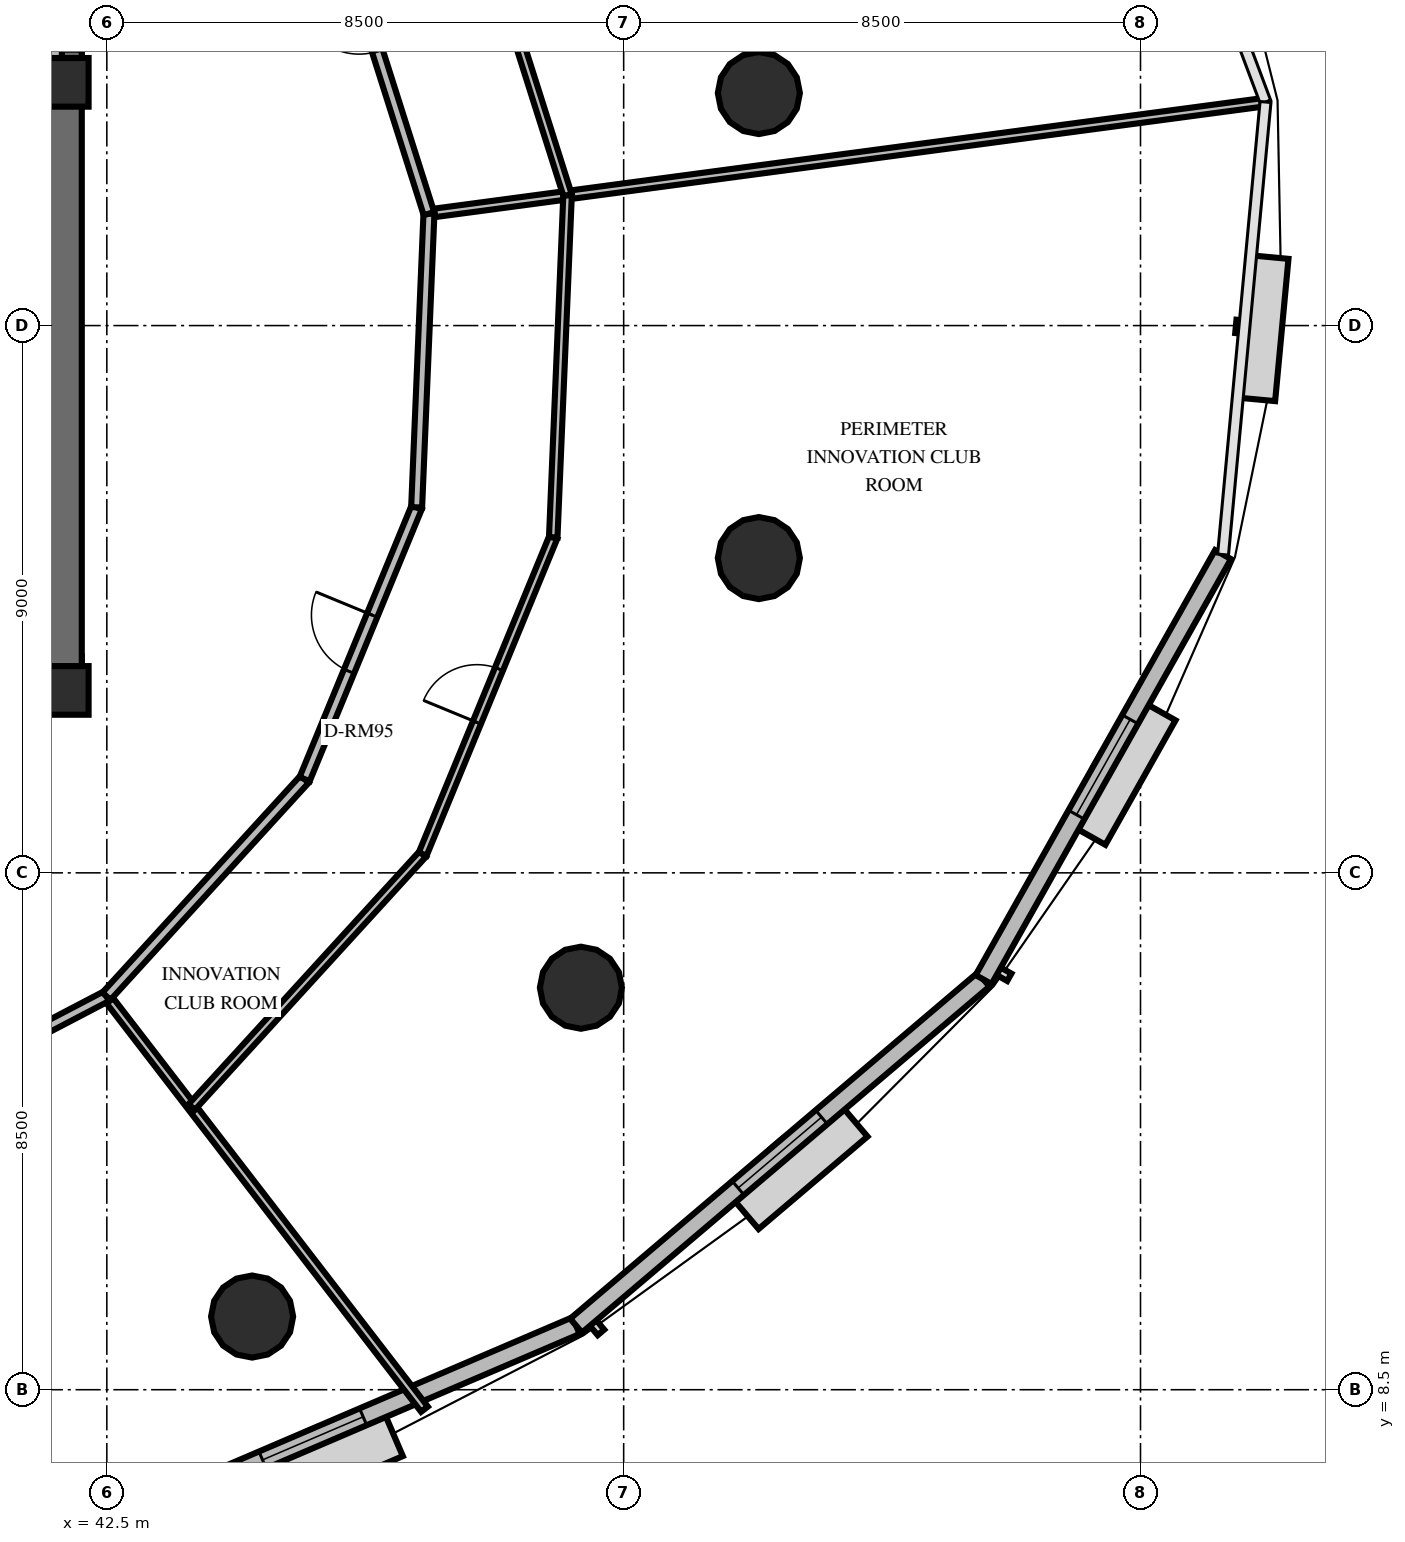
"""IFC4 building model, lengths in metres.
Left out: names, types, materials, properties, quantities, classifications, styles, units other than length and angle.
Written with IfcOpenShell. Run it as: python <this file> out.ifc"""

import sys

from ifc_helpers import new_model, si_unit, direction, frame, frame_2d, origin, origin_2d, place, context, subcontext, project, spatial, rectangle, circle, extrude, element, fill, save


model = new_model("IFC4")
c1 = context("Model", 3, precision=1e-05, world=origin(), true_north=direction((0.0, 1.0)))
c2 = subcontext(c1, "Body", "Model", "MODEL_VIEW")
j1 = project(units=[si_unit("LENGTHUNIT", "METRE"), si_unit("PLANEANGLEUNIT", "RADIAN")], contexts=[c1])
p1 = place(None, origin())
s1 = spatial("IfcSite", under=j1, at=p1, CompositionType="ELEMENT")
p2 = place(p1, origin())
s2 = spatial("IfcBuilding", under=s1, at=p2, CompositionType="ELEMENT")
p3 = place(p2, frame((0.0, 0.0, 63.6)))
s3 = spatial("IfcBuildingStorey", under=s2, at=p3, CompositionType="ELEMENT", Elevation=63.6)
p4 = place(p3, frame((25.922, 20.112, 0.0), z_axis=(0.0, 0.0, 1.0), x_axis=(1.0, 0.0, 0.0)))
e1 = element("IfcWall", 1, at=p4, inside=s3, PredefinedType="SHEAR", context=c2, shape_type="SweptSolid", body=[
    extrude(rectangle(XDim=16.166, YDim=0.9, at=frame_2d((8.083, 0.0))), origin(), (0.0, 0.0, 1.0), 4.2),
])
p5 = place(p3, frame((25.922, 30.088, 0.0), z_axis=(0.0, 0.0, 1.0), x_axis=(1.0, 0.0, 0.0)))
e2 = element("IfcWall", 2, at=p5, inside=s3, PredefinedType="SHEAR", context=c2, shape_type="SweptSolid", body=[
    extrude(rectangle(XDim=16.166, YDim=0.9, at=frame_2d((8.083, 0.0))), origin(), (0.0, 0.0, 1.0), 4.2),
])
p6 = place(p5, frame((1.028, 0.0, 0.0)))
e3 = element("IfcOpeningElement", 3, at=p6, cuts=e2, PredefinedType="OPENING", context=c2, shape_type="SweptSolid", body=[
    extrude(rectangle(XDim=1.05, YDim=2.15, at=frame_2d((0.525, 1.075))), frame((0.0, 0.46, 0.0), z_axis=(0.0, -1.0, 0.0), x_axis=(1.0, 0.0, 0.0)), (0.0, 0.0, 1.0), 0.92),
])
p7 = place(p5, frame((14.078, 0.0, 0.0)))
e4 = element("IfcOpeningElement", 4, at=p7, cuts=e2, PredefinedType="OPENING", context=c2, shape_type="SweptSolid", body=[
    extrude(rectangle(XDim=1.05, YDim=2.15, at=frame_2d((0.525, 1.075))), frame((0.0, 0.46, 0.0), z_axis=(0.0, -1.0, 0.0), x_axis=(1.0, 0.0, 0.0)), (0.0, 0.0, 1.0), 0.92),
])
p8 = place(p5, frame((7.528, 0.0, 0.0)))
e5 = element("IfcOpeningElement", 5, at=p8, cuts=e2, PredefinedType="OPENING", context=c2, shape_type="SweptSolid", body=[
    extrude(rectangle(XDim=1.1, YDim=2.15, at=frame_2d((0.55, 1.075))), frame((0.0, 0.46, 0.0), z_axis=(0.0, -1.0, 0.0), x_axis=(1.0, 0.0, 0.0)), (0.0, 0.0, 1.0), 0.92),
])
p9 = place(p3, frame((41.638, 19.662, 0.0), z_axis=(0.0, 0.0, 1.0), x_axis=(0.0, 1.0, 0.0)))
e6 = element("IfcWall", 6, at=p9, inside=s3, PredefinedType="SHEAR", context=c2, shape_type="SweptSolid", body=[
    extrude(rectangle(XDim=10.876, YDim=0.9, at=frame_2d((5.438, 0.0))), origin(), (0.0, 0.0, 1.0), 4.2),
])
for number, where, z_axis, x_axis in (
    (7, (41.8, 20.0, 0.0), (0.0, 0.0, 1.0), (1.0, 0.0, 0.0)),
    (8, (41.8, 30.0, 0.0), (0.0, 0.0, 1.0), (1.0, 0.0, 0.0)),
):
    element("IfcColumn", number, at=place(p3, frame(where, z_axis=z_axis, x_axis=x_axis)), inside=s3, PredefinedType="PILASTER", context=c2, shape_type="SweptSolid", body=[
        extrude(rectangle(XDim=0.8, YDim=0.8, at=origin_2d()), origin(), (0.0, 0.0, 1.0), 4.2),
    ])
for number, where, z_axis, x_axis in (
    (9, (53.223, 29.824, 0.0), (0.0, 0.0, 1.0), (1.0, 0.0, 0.0)),
    (10, (44.889, 9.703, 0.0), (0.0, 0.0, 1.0), (1.0, 0.0, 0.0)),
    (11, (50.297, 15.111, 0.0), (0.0, 0.0, 1.0), (1.0, 0.0, 0.0)),
    (12, (53.223, 22.176, 0.0), (0.0, 0.0, 1.0), (1.0, 0.0, 0.0)),
):
    element("IfcColumn", number, at=place(p3, frame(where, z_axis=z_axis, x_axis=x_axis)), inside=s3, PredefinedType="COLUMN", context=c2, shape_type="SweptSolid", body=[
        extrude(circle(Radius=0.675, at=origin_2d()), origin(), (0.0, 0.0, 1.0), 4.2),
    ])
p10 = place(p3, frame((41.559, 5.846, 0.0), z_axis=(0.0, 0.0, 1.0), x_axis=(0.919246893901, 0.393681531259, 0.0)))
e13 = element("IfcWall", 13, at=p10, inside=s3, PredefinedType="SOLIDWALL", context=c2, shape_type="SweptSolid", body=[
    extrude(rectangle(XDim=9.419, YDim=0.3, at=frame_2d((4.709, 0.0))), origin(), (0.0, 0.0, 1.0), 3.0),
])
p11 = place(p10, frame((3.809, 0.0, 0.8)))
e14 = element("IfcOpeningElement", 14, at=p11, cuts=e13, PredefinedType="OPENING", context=c2, shape_type="SweptSolid", body=[
    extrude(rectangle(XDim=1.8, YDim=1.95, at=frame_2d((0.9, 0.975))), frame((0.0, 0.16, 0.0), z_axis=(0.0, -1.0, 0.0), x_axis=(1.0, 0.0, 0.0)), (0.0, 0.0, 1.0), 0.32),
])
p12 = place(p3, frame((50.218, 9.554, 0.0), z_axis=(0.0, 0.0, 1.0), x_axis=(0.76225711474, 0.6472743553, 0.0)))
e15 = element("IfcWall", 15, at=p12, inside=s3, PredefinedType="SOLIDWALL", context=c2, shape_type="SweptSolid", body=[
    extrude(rectangle(XDim=8.792, YDim=0.3, at=frame_2d((4.396, 0.0))), origin(), (0.0, 0.0, 1.0), 3.0),
])
p13 = place(p12, frame((3.496, 0.0, 0.8)))
e16 = element("IfcOpeningElement", 16, at=p13, cuts=e15, PredefinedType="OPENING", context=c2, shape_type="SweptSolid", body=[
    extrude(rectangle(XDim=1.8, YDim=1.95, at=frame_2d((0.9, 0.975))), frame((0.0, 0.16, 0.0), z_axis=(0.0, -1.0, 0.0), x_axis=(1.0, 0.0, 0.0)), (0.0, 0.0, 1.0), 0.32),
])
p14 = place(p3, frame((56.92, 15.245, 0.0), z_axis=(0.0, 0.0, 1.0), x_axis=(0.490895470353, 0.871218478446, 0.0)))
e17 = element("IfcWall", 17, at=p14, inside=s3, PredefinedType="SOLIDWALL", context=c2, shape_type="SweptSolid", body=[
    extrude(rectangle(XDim=8.021, YDim=0.3, at=frame_2d((4.011, 0.0))), origin(), (0.0, 0.0, 1.0), 3.0),
])
p15 = place(p14, frame((3.111, 0.0, 0.8)))
e18 = element("IfcOpeningElement", 18, at=p15, cuts=e17, PredefinedType="OPENING", context=c2, shape_type="SweptSolid", body=[
    extrude(rectangle(XDim=1.8, YDim=1.95, at=frame_2d((0.9, 0.975))), frame((0.0, 0.16, 0.0), z_axis=(0.0, -1.0, 0.0), x_axis=(1.0, 0.0, 0.0)), (0.0, 0.0, 1.0), 0.32),
])
p16 = place(p3, frame((41.65, 30.05, 0.0), z_axis=(0.0, 0.0, 1.0), x_axis=(0.0, 1.0, 0.0)))
e19 = element("IfcWall", 19, at=p16, inside=s3, PredefinedType="SOLIDWALL", context=c2, shape_type="SweptSolid", body=[
    extrude(rectangle(XDim=4.38, YDim=0.22, at=frame_2d((2.19, 0.0))), origin(), (0.0, 0.0, 1.0), 3.0),
])
p17 = place(p3, frame((42.493, 14.971, 0.0), z_axis=(0.0, 0.0, 1.0), x_axis=(0.610157960661, -0.792279788359, 0.0)))
e20 = element("IfcWall", 20, at=p17, inside=s3, PredefinedType="PARTITIONING", context=c2, shape_type="SweptSolid", body=[
    extrude(rectangle(XDim=8.573, YDim=0.14, at=frame_2d((4.286, 0.0))), origin(), (0.0, 0.0, 1.0), 3.0),
])
p18 = place(p3, frame((38.209, 12.732, 0.0), z_axis=(0.0, 0.0, 1.0), x_axis=(0.886221674156, 0.463261421075, 0.0)))
e21 = element("IfcWall", 21, at=p18, inside=s3, PredefinedType="PARTITIONING", context=c2, shape_type="SweptSolid", body=[
    extrude(rectangle(XDim=4.834, YDim=0.18, at=frame_2d((2.417, 0.0))), origin(), (0.0, 0.0, 1.0), 3.0),
])
p19 = place(p18, frame((0.996, 0.0, 0.0)))
e22 = element("IfcOpeningElement", 22, at=p19, cuts=e21, PredefinedType="OPENING", context=c2, shape_type="SweptSolid", body=[
    extrude(rectangle(XDim=1.15, YDim=2.15, at=frame_2d((0.575, 1.075))), frame((0.0, 0.1, 0.0), z_axis=(0.0, -1.0, 0.0), x_axis=(1.0, 0.0, 0.0)), (0.0, 0.0, 1.0), 0.2),
])
p20 = place(p3, frame((47.798, 27.841, 0.0), z_axis=(0.0, 0.0, 1.0), x_axis=(0.991216068236, 0.132252433138, 0.0)))
e23 = element("IfcWall", 23, at=p20, inside=s3, PredefinedType="PARTITIONING", context=c2, shape_type="SweptSolid", body=[
    extrude(rectangle(XDim=13.88, YDim=0.14, at=frame_2d((6.94, 0.0))), origin(), (0.0, 0.0, 1.0), 3.0),
])
p21 = place(p3, frame((42.493, 14.971, 0.0), z_axis=(0.0, 0.0, 1.0), x_axis=(0.674284930573, 0.738471280689, 0.0)))
e24 = element("IfcWall", 24, at=p21, inside=s3, PredefinedType="PARTITIONING", context=c2, shape_type="SweptSolid", body=[
    extrude(rectangle(XDim=4.834, YDim=0.18, at=frame_2d((2.417, 0.0))), origin(), (0.0, 0.0, 1.0), 3.0),
])
p22 = place(p3, frame((45.753, 18.541, 0.0), z_axis=(0.0, 0.0, 1.0), x_axis=(0.381069812318, 0.92454626609, 0.0)))
e25 = element("IfcWall", 25, at=p22, inside=s3, PredefinedType="PARTITIONING", context=c2, shape_type="SweptSolid", body=[
    extrude(rectangle(XDim=4.834, YDim=0.18, at=frame_2d((2.417, 0.0))), origin(), (0.0, 0.0, 1.0), 3.0),
])
p23 = place(p22, frame((1.917, 0.0, 0.0)))
e26 = element("IfcOpeningElement", 26, at=p23, cuts=e25, PredefinedType="OPENING", context=c2, shape_type="SweptSolid", body=[
    extrude(rectangle(XDim=1.0, YDim=2.15, at=frame_2d((0.5, 1.075))), frame((0.0, 0.1, 0.0), z_axis=(0.0, -1.0, 0.0), x_axis=(1.0, 0.0, 0.0)), (0.0, 0.0, 1.0), 0.2),
])
p24 = place(p3, frame((47.595, 23.011, 0.0), z_axis=(0.0, 0.0, 1.0), x_axis=(0.041865809147, 0.999123242661, 0.0)))
e27 = element("IfcWall", 27, at=p24, inside=s3, PredefinedType="PARTITIONING", context=c2, shape_type="SweptSolid", body=[
    extrude(rectangle(XDim=4.834, YDim=0.18, at=frame_2d((2.417, 0.0))), origin(), (0.0, 0.0, 1.0), 3.0),
])
p25 = place(p3, frame((43.896, 13.149, 0.0), z_axis=(0.0, 0.0, 1.0), x_axis=(0.674329993332, 0.738430132167, 0.0)))
e28 = element("IfcWall", 28, at=p25, inside=s3, PredefinedType="PARTITIONING", context=c2, shape_type="SweptSolid", body=[
    extrude(rectangle(XDim=5.633, YDim=0.14, at=frame_2d((2.816, 0.0))), origin(), (0.0, 0.0, 1.0), 3.0),
])
p26 = place(p3, frame((47.695, 17.309, 0.0), z_axis=(0.0, 0.0, 1.0), x_axis=(0.381039698685, 0.924558677438, 0.0)))
e29 = element("IfcWall", 29, at=p26, inside=s3, PredefinedType="PARTITIONING", context=c2, shape_type="SweptSolid", body=[
    extrude(rectangle(XDim=5.633, YDim=0.14, at=frame_2d((2.817, 0.0))), origin(), (0.0, 0.0, 1.0), 3.0),
])
p27 = place(p26, frame((2.342, 0.0, 0.0)))
e30 = element("IfcOpeningElement", 30, at=p27, cuts=e29, PredefinedType="OPENING", context=c2, shape_type="SweptSolid", body=[
    extrude(rectangle(XDim=0.95, YDim=2.15, at=frame_2d((0.475, 1.075))), frame((0.0, 0.08, 0.0), z_axis=(0.0, -1.0, 0.0), x_axis=(1.0, 0.0, 0.0)), (0.0, 0.0, 1.0), 0.16),
])
p28 = place(p3, frame((49.842, 22.517, 0.0), z_axis=(0.0, 0.0, 1.0), x_axis=(0.041866699188, 0.999123205365, 0.0)))
e31 = element("IfcWall", 31, at=p28, inside=s3, PredefinedType="PARTITIONING", context=c2, shape_type="SweptSolid", body=[
    extrude(rectangle(XDim=5.633, YDim=0.14, at=frame_2d((2.816, 0.0))), origin(), (0.0, 0.0, 1.0), 3.0),
])
p29 = place(p3, frame((47.798, 27.841, 0.0), z_axis=(0.0, 0.0, 1.0), x_axis=(-0.302346825509, 0.953197984212, 0.0)))
e32 = element("IfcWall", 32, at=p29, inside=s3, PredefinedType="PARTITIONING", context=c2, shape_type="SweptSolid", body=[
    extrude(rectangle(XDim=4.834, YDim=0.18, at=frame_2d((2.417, 0.0))), origin(), (0.0, 0.0, 1.0), 3.0),
])
p30 = place(p29, frame((2.801, 0.0, 0.0)))
e33 = element("IfcOpeningElement", 33, at=p30, cuts=e32, PredefinedType="OPENING", context=c2, shape_type="SweptSolid", body=[
    extrude(rectangle(XDim=1.0, YDim=2.15, at=frame_2d((0.5, 1.075))), frame((0.0, 0.1, 0.0), z_axis=(0.0, -1.0, 0.0), x_axis=(1.0, 0.0, 0.0)), (0.0, 0.0, 1.0), 0.2),
])
p31 = place(p3, frame((50.077, 28.145, 0.0), z_axis=(0.0, 0.0, 1.0), x_axis=(-0.302346635655, 0.953198044432, 0.0)))
e34 = element("IfcWall", 34, at=p31, inside=s3, PredefinedType="PARTITIONING", context=c2, shape_type="SweptSolid", body=[
    extrude(rectangle(XDim=5.633, YDim=0.14, at=frame_2d((2.816, 0.0))), origin(), (0.0, 0.0, 1.0), 3.0),
])
p32 = place(p31, frame((3.422, 0.0, 0.0)))
e35 = element("IfcOpeningElement", 35, at=p32, cuts=e34, PredefinedType="OPENING", context=c2, shape_type="SweptSolid", body=[
    extrude(rectangle(XDim=0.95, YDim=2.15, at=frame_2d((0.475, 1.075))), frame((0.0, 0.08, 0.0), z_axis=(0.0, -1.0, 0.0), x_axis=(1.0, 0.0, 0.0)), (0.0, 0.0, 1.0), 0.16),
])
p33 = place(p11, origin())
e36 = element("IfcWindow", 36, at=p33, inside=s3, PartitioningType="SINGLE_PANEL", PredefinedType="WINDOW", context=c2, shape_type="SweptSolid", body=[
    extrude(rectangle(XDim=1.8, YDim=1.95, at=frame_2d((0.9, 0.975))), frame((0.0, 0.03, 0.0), z_axis=(0.0, -1.0, 0.0), x_axis=(1.0, 0.0, 0.0)), (0.0, 0.0, 1.0), 0.06),
])
fill(e14, e36)
p34 = place(p13, origin())
e37 = element("IfcWindow", 37, at=p34, inside=s3, PartitioningType="SINGLE_PANEL", PredefinedType="WINDOW", context=c2, shape_type="SweptSolid", body=[
    extrude(rectangle(XDim=1.8, YDim=1.95, at=frame_2d((0.9, 0.975))), frame((0.0, 0.03, 0.0), z_axis=(0.0, -1.0, 0.0), x_axis=(1.0, 0.0, 0.0)), (0.0, 0.0, 1.0), 0.06),
])
fill(e16, e37)
p35 = place(p15, origin())
e38 = element("IfcWindow", 38, at=p35, inside=s3, PartitioningType="SINGLE_PANEL", PredefinedType="WINDOW", context=c2, shape_type="SweptSolid", body=[
    extrude(rectangle(XDim=1.8, YDim=1.95, at=frame_2d((0.9, 0.975))), frame((0.0, 0.03, 0.0), z_axis=(0.0, -1.0, 0.0), x_axis=(1.0, 0.0, 0.0)), (0.0, 0.0, 1.0), 0.06),
])
fill(e18, e38)
p36 = place(p23, origin())
e39 = element("IfcDoor", 39, at=p36, inside=s3, OperationType="SINGLE_SWING_RIGHT", PredefinedType="DOOR", context=c2, shape_type="SweptSolid", body=[
    extrude(rectangle(XDim=1.0, YDim=2.15, at=frame_2d((0.5, 1.075))), frame((0.0, 0.025, 0.0), z_axis=(0.0, -1.0, 0.0), x_axis=(1.0, 0.0, 0.0)), (0.0, 0.0, 1.0), 0.05),
])
fill(e26, e39)
p37 = place(p27, origin())
e40 = element("IfcDoor", 40, at=p37, inside=s3, OperationType="SINGLE_SWING_LEFT", PredefinedType="DOOR", context=c2, shape_type="SweptSolid", body=[
    extrude(rectangle(XDim=0.95, YDim=2.15, at=frame_2d((0.475, 1.075))), frame((0.0, 0.025, 0.0), z_axis=(0.0, -1.0, 0.0), x_axis=(1.0, 0.0, 0.0)), (0.0, 0.0, 1.0), 0.05),
])
fill(e30, e40)
save(model, sys.argv[1])
